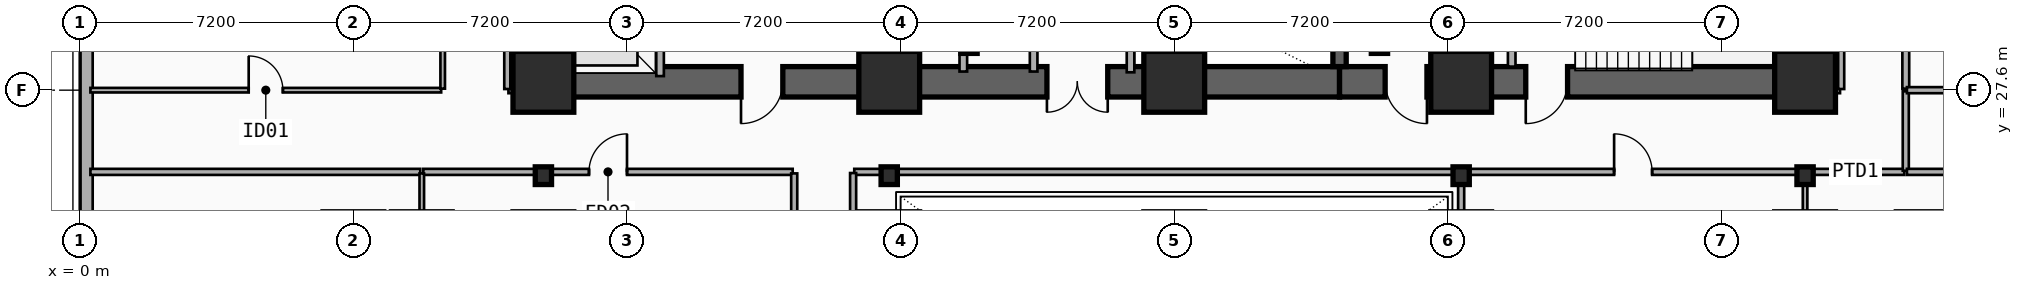
"""IFC4 building model, lengths in metres.
Left out: names, types, materials, properties, quantities, classifications, styles, units other than length and angle.
Written with IfcOpenShell. Run it as: python <this file> out.ifc"""

import sys

from ifc_helpers import new_model, si_unit, direction, frame, frame_2d, origin, origin_2d, place, context, subcontext, project, spatial, rectangle, i_section, extrude, element, fill, save


model = new_model("IFC4")
c1 = context("Model", 3, precision=1e-05, world=origin(), true_north=direction((0.0, 1.0)))
c2 = subcontext(c1, "Body", "Model", "MODEL_VIEW")
j1 = project(units=[si_unit("LENGTHUNIT", "METRE"), si_unit("PLANEANGLEUNIT", "RADIAN")], contexts=[c1])
p1 = place(None, origin())
s1 = spatial("IfcSite", under=j1, at=p1, CompositionType="ELEMENT")
p2 = place(p1, origin())
s2 = spatial("IfcBuilding", under=s1, at=p2, CompositionType="ELEMENT")
p3 = place(p2, frame((0.0, 0.0, 10.4)))
s3 = spatial("IfcBuildingStorey", under=s2, at=p3, CompositionType="ELEMENT", Elevation=10.4)
p4 = place(p3, frame((21.18, 27.82, 0.0), z_axis=(0.0, 0.0, 1.0), x_axis=(-1.0, 0.0, 0.0)))
e1 = element("IfcWall", 1, at=p4, inside=s3, PredefinedType="SHEAR", context=c2, shape_type="SweptSolid", body=[
    extrude(rectangle(XDim=9.03, YDim=0.8, at=frame_2d((4.515, 0.0))), origin(), (0.0, 0.0, 1.0), 4.5),
])
p5 = place(p4, frame((2.68, 0.0, 0.0)))
e2 = element("IfcOpeningElement", 2, at=p5, cuts=e1, PredefinedType="OPENING", context=c2, shape_type="SweptSolid", body=[
    extrude(rectangle(XDim=1.1, YDim=2.15, at=frame_2d((0.55, 1.075))), frame((0.0, 0.41, 0.0), z_axis=(0.0, -1.0, 0.0), x_axis=(1.0, 0.0, 0.0)), (0.0, 0.0, 1.0), 0.82),
])
p6 = place(p3, frame((33.15, 27.82, 0.0), z_axis=(0.0, 0.0, 1.0), x_axis=(-1.0, 0.0, 0.0)))
e3 = element("IfcWall", 3, at=p6, inside=s3, PredefinedType="SHEAR", context=c2, shape_type="SweptSolid", body=[
    extrude(rectangle(XDim=11.97, YDim=0.8, at=frame_2d((5.985, 0.0))), origin(), (0.0, 0.0, 1.0), 4.5),
])
p7 = place(p6, frame((6.1, 0.0, 0.0)))
e4 = element("IfcOpeningElement", 4, at=p7, cuts=e3, PredefinedType="OPENING", context=c2, shape_type="SweptSolid", body=[
    extrude(rectangle(XDim=1.6, YDim=2.2, at=frame_2d((0.8, 1.1))), frame((0.0, 0.41, 0.0), z_axis=(0.0, -1.0, 0.0), x_axis=(1.0, 0.0, 0.0)), (0.0, 0.0, 1.0), 0.82),
])
p8 = place(p3, frame((45.38, 27.82, 0.0), z_axis=(0.0, 0.0, 1.0), x_axis=(-1.0, 0.0, 0.0)))
e5 = element("IfcWall", 5, at=p8, inside=s3, PredefinedType="SHEAR", context=c2, shape_type="SweptSolid", body=[
    extrude(rectangle(XDim=12.23, YDim=0.8, at=frame_2d((6.115, 0.0))), origin(), (0.0, 0.0, 1.0), 4.5),
])
p9 = place(p8, frame((9.93, 0.0, 0.0)))
e6 = element("IfcOpeningElement", 6, at=p9, cuts=e5, PredefinedType="OPENING", context=c2, shape_type="SweptSolid", body=[
    extrude(rectangle(XDim=1.1, YDim=2.15, at=frame_2d((0.55, 1.075))), frame((0.0, 0.41, 0.0), z_axis=(0.0, -1.0, 0.0), x_axis=(1.0, 0.0, 0.0)), (0.0, 0.0, 1.0), 0.82),
])
p10 = place(p8, frame((6.23, 0.0, 0.0)))
e7 = element("IfcOpeningElement", 7, at=p10, cuts=e5, PredefinedType="OPENING", context=c2, shape_type="SweptSolid", body=[
    extrude(rectangle(XDim=1.1, YDim=2.15, at=frame_2d((0.55, 1.075))), frame((0.0, 0.41, 0.0), z_axis=(0.0, -1.0, 0.0), x_axis=(1.0, 0.0, 0.0)), (0.0, 0.0, 1.0), 0.82),
])
for number, where, z_axis, x_axis in (
    (8, (12.15, 28.22, 0.0), (0.0, 0.0, 1.0), (0.0, 1.0, 0.0)),
    (9, (45.38, 28.22, 0.0), (0.0, 0.0, 1.0), (0.0, 1.0, 0.0)),
):
    element("IfcWall", number, at=place(p3, frame(where, z_axis=z_axis, x_axis=x_axis)), inside=s3, PredefinedType="SHEAR", context=c2, shape_type="SweptSolid", body=[
        extrude(rectangle(XDim=8.43, YDim=0.8, at=frame_2d((4.215, 0.0))), origin(), (0.0, 0.0, 1.0), 4.5),
    ])
for number, where, z_axis, x_axis in (
    (10, (21.18, 28.22, 0.0), (0.0, 0.0, 1.0), (0.0, 1.0, 0.0)),
    (11, (33.15, 28.22, 0.0), (0.0, 0.0, 1.0), (0.0, 1.0, 0.0)),
):
    element("IfcWall", number, at=place(p3, frame(where, z_axis=z_axis, x_axis=x_axis)), inside=s3, PredefinedType="SHEAR", context=c2, shape_type="SweptSolid", body=[
        extrude(rectangle(XDim=8.43, YDim=0.35, at=frame_2d((4.215, 0.0))), origin(), (0.0, 0.0, 1.0), 4.5),
    ])
p11 = place(p3, frame((36.38, 28.22, 0.0), z_axis=(0.0, 0.0, 1.0), x_axis=(0.0, 1.0, 0.0)))
e12 = element("IfcWall", 12, at=p11, inside=s3, PredefinedType="SHEAR", context=c2, shape_type="SweptSolid", body=[
    extrude(rectangle(XDim=8.43, YDim=0.35, at=frame_2d((4.215, 0.0))), origin(), (0.0, 0.0, 1.0), 4.5),
])
p12 = place(p11, frame((3.56, 0.0, 0.0)))
e13 = element("IfcOpeningElement", 13, at=p12, cuts=e12, PredefinedType="OPENING", context=c2, shape_type="SweptSolid", body=[
    extrude(rectangle(XDim=1.1, YDim=2.15, at=frame_2d((0.55, 1.075))), frame((0.0, 0.185, 0.0), z_axis=(0.0, -1.0, 0.0), x_axis=(1.0, 0.0, 0.0)), (0.0, 0.0, 1.0), 0.37),
])
for number, where, z_axis, x_axis in (
    (14, (23.4, 28.8, 0.0), (0.0, 0.0, 1.0), (1.0, 0.0, 0.0)),
    (15, (34.2, 28.8, 0.0), (0.0, 0.0, 1.0), (1.0, 0.0, 0.0)),
):
    element("IfcColumn", number, at=place(p3, frame(where, z_axis=z_axis, x_axis=x_axis)), inside=s3, PredefinedType="COLUMN", context=c2, shape_type="SweptSolid", body=[
        extrude(i_section(OverallWidth=0.428, OverallDepth=0.465, WebThickness=0.045, FlangeThickness=0.073, FilletRadius=0.015, at=origin_2d()), origin(), (0.0, 0.0, 1.0), 4.5),
    ])
for number, where, z_axis, x_axis in (
    (16, (12.2, 27.82, 0.0), (0.0, 0.0, 1.0), (1.0, 0.0, 0.0)),
    (17, (21.3, 27.82, 0.0), (0.0, 0.0, 1.0), (1.0, 0.0, 0.0)),
    (18, (28.8, 27.82, 0.0), (0.0, 0.0, 1.0), (1.0, 0.0, 0.0)),
    (19, (36.35, 27.82, 0.0), (0.0, 0.0, 1.0), (1.0, 0.0, 0.0)),
    (20, (45.4, 27.82, 0.0), (0.0, 0.0, 1.0), (1.0, 0.0, 0.0)),
):
    element("IfcColumn", number, at=place(p3, frame(where, z_axis=z_axis, x_axis=x_axis)), inside=s3, PredefinedType="COLUMN", context=c2, shape_type="SweptSolid", body=[
        extrude(rectangle(XDim=1.6, YDim=1.6, at=origin_2d()), origin(), (0.0, 0.0, 1.0), 4.5),
    ])
for number, where, z_axis, x_axis in (
    (21, (12.2, 25.35, 0.0), (0.0, 0.0, 1.0), (1.0, 0.0, 0.0)),
    (22, (21.3, 25.35, 0.0), (0.0, 0.0, 1.0), (1.0, 0.0, 0.0)),
    (23, (36.35, 25.35, 0.0), (0.0, 0.0, 1.0), (1.0, 0.0, 0.0)),
    (24, (45.4, 25.35, 0.0), (0.0, 0.0, 1.0), (1.0, 0.0, 0.0)),
):
    element("IfcColumn", number, at=place(p3, frame(where, z_axis=z_axis, x_axis=x_axis)), inside=s3, PredefinedType="COLUMN", context=c2, shape_type="SweptSolid", body=[
        extrude(i_section(OverallWidth=0.428, OverallDepth=0.465, WebThickness=0.045, FlangeThickness=0.073, FilletRadius=0.015, at=origin_2d()), origin(), (0.0, 0.0, 1.0), 4.5),
    ])
p13 = place(p3, frame((0.18, 7.2, 0.0), z_axis=(0.0, 0.0, 1.0), x_axis=(0.0, 1.0, 0.0)))
e25 = element("IfcWall", 25, at=p13, inside=s3, PredefinedType="SOLIDWALL", context=c2, shape_type="SweptSolid", body=[
    extrude(rectangle(XDim=34.4, YDim=0.32, at=frame_2d((17.2, 0.0))), origin(), (0.0, 0.0, 1.0), 4.2),
])
p14 = place(p13, frame((22.35, 0.0, 0.9)))
e26 = element("IfcOpeningElement", 26, at=p14, cuts=e25, PredefinedType="OPENING", context=c2, shape_type="SweptSolid", body=[
    extrude(rectangle(XDim=2.4, YDim=1.8, at=frame_2d((1.2, 0.9))), frame((0.0, 0.17, 0.0), z_axis=(0.0, -1.0, 0.0), x_axis=(1.0, 0.0, 0.0)), (0.0, 0.0, 1.0), 0.34),
])
p15 = place(p13, frame((26.4, 0.0, 0.9)))
e27 = element("IfcOpeningElement", 27, at=p15, cuts=e25, PredefinedType="OPENING", context=c2, shape_type="SweptSolid", body=[
    extrude(rectangle(XDim=2.4, YDim=1.8, at=frame_2d((1.2, 0.9))), frame((0.0, 0.17, 0.0), z_axis=(0.0, -1.0, 0.0), x_axis=(1.0, 0.0, 0.0)), (0.0, 0.0, 1.0), 0.34),
])
p16 = place(p13, frame((4.597, 0.0, 0.9)))
e28 = element("IfcOpeningElement", 28, at=p16, cuts=e25, PredefinedType="OPENING", context=c2, shape_type="SweptSolid", body=[
    extrude(rectangle(XDim=2.4, YDim=1.8, at=frame_2d((1.2, 0.9))), frame((0.0, 0.17, 0.0), z_axis=(0.0, -1.0, 0.0), x_axis=(1.0, 0.0, 0.0)), (0.0, 0.0, 1.0), 0.34),
])
p17 = place(p13, frame((11.273, 0.0, 0.9)))
e29 = element("IfcOpeningElement", 29, at=p17, cuts=e25, PredefinedType="OPENING", context=c2, shape_type="SweptSolid", body=[
    extrude(rectangle(XDim=2.4, YDim=1.8, at=frame_2d((1.2, 0.9))), frame((0.0, 0.17, 0.0), z_axis=(0.0, -1.0, 0.0), x_axis=(1.0, 0.0, 0.0)), (0.0, 0.0, 1.0), 0.34),
])
p18 = place(p3, frame((15.27, 27.97, 0.0), z_axis=(0.0, 0.0, 1.0), x_axis=(0.0, 1.0, 0.0)))
e30 = element("IfcWall", 30, at=p18, inside=s3, PredefinedType="PARTITIONING", context=c2, shape_type="SweptSolid", body=[
    extrude(rectangle(XDim=2.96, YDim=0.2, at=frame_2d((1.48, 0.0))), origin(), (0.0, 0.0, 1.0), 3.172),
])
p19 = place(p18, frame((0.93, 0.0, 0.0)))
e31 = element("IfcOpeningElement", 31, at=p19, cuts=e30, PredefinedType="OPENING", context=c2, shape_type="SweptSolid", body=[
    extrude(rectangle(XDim=1.1, YDim=2.15, at=frame_2d((0.55, 1.075))), frame((0.0, 0.11, 0.0), z_axis=(0.0, -1.0, 0.0), x_axis=(1.0, 0.0, 0.0)), (0.0, 0.0, 1.0), 0.22),
])
p20 = place(p3, frame((27.65, 28.07, 0.0), z_axis=(0.0, 0.0, 1.0), x_axis=(0.0, 1.0, 0.0)))
e32 = element("IfcWall", 32, at=p20, inside=s3, PredefinedType="PARTITIONING", context=c2, shape_type="SweptSolid", body=[
    extrude(rectangle(XDim=2.58, YDim=0.2, at=frame_2d((1.29, 0.0))), origin(), (0.0, 0.0, 1.0), 3.172),
])
p21 = place(p3, frame((37.68, 28.22, 0.0), z_axis=(0.0, 0.0, 1.0), x_axis=(0.0, 1.0, 0.0)))
e33 = element("IfcWall", 33, at=p21, inside=s3, PredefinedType="PARTITIONING", context=c2, shape_type="SweptSolid", body=[
    extrude(rectangle(XDim=3.03, YDim=0.2, at=frame_2d((1.515, 0.0))), origin(), (0.0, 0.0, 1.0), 4.2),
])
p22 = place(p3, frame((25.1, 28.09, 0.0), z_axis=(0.0, 0.0, 1.0), x_axis=(0.0, 1.0, 0.0)))
e34 = element("IfcWall", 34, at=p22, inside=s3, PredefinedType="PARTITIONING", context=c2, shape_type="SweptSolid", body=[
    extrude(rectangle(XDim=4.12, YDim=0.2, at=frame_2d((2.06, 0.0))), origin(), (0.0, 0.0, 1.0), 4.2),
])
p23 = place(p22, frame((1.46, 0.0, 0.0)))
e35 = element("IfcOpeningElement", 35, at=p23, cuts=e34, PredefinedType="OPENING", context=c2, shape_type="SweptSolid", body=[
    extrude(rectangle(XDim=1.2, YDim=2.15, at=frame_2d((0.6, 1.075))), frame((0.0, 0.11, 0.0), z_axis=(0.0, -1.0, 0.0), x_axis=(1.0, 0.0, 0.0)), (0.0, 0.0, 1.0), 0.22),
])
p24 = place(p3, frame((23.25, 28.09, 0.0), z_axis=(0.0, 0.0, 1.0), x_axis=(0.0, 1.0, 0.0)))
e36 = element("IfcWall", 36, at=p24, inside=s3, PredefinedType="PARTITIONING", context=c2, shape_type="SweptSolid", body=[
    extrude(rectangle(XDim=4.12, YDim=0.2, at=frame_2d((2.06, 0.0))), origin(), (0.0, 0.0, 1.0), 4.2),
])
p25 = place(p3, frame((0.28, 27.6, 0.0), z_axis=(0.0, 0.0, 1.0), x_axis=(1.0, 0.0, 0.0)))
e37 = element("IfcWall", 37, at=p25, inside=s3, PredefinedType="PARTITIONING", context=c2, shape_type="SweptSolid", body=[
    extrude(rectangle(XDim=9.23, YDim=0.12, at=frame_2d((4.615, 0.0))), origin(), (0.0, 0.0, 1.0), 4.2),
])
p26 = place(p25, frame((4.165, 0.0, 0.0)))
e38 = element("IfcOpeningElement", 38, at=p26, cuts=e37, PredefinedType="OPENING", context=c2, shape_type="SweptSolid", body=[
    extrude(rectangle(XDim=0.9, YDim=2.1, at=frame_2d((0.45, 1.05))), frame((0.0, 0.07, 0.0), z_axis=(0.0, -1.0, 0.0), x_axis=(1.0, 0.0, 0.0)), (0.0, 0.0, 1.0), 0.14),
])
p27 = place(p3, frame((0.28, 25.45, 0.0), z_axis=(0.0, 0.0, 1.0), x_axis=(1.0, 0.0, 0.0)))
e39 = element("IfcWall", 39, at=p27, inside=s3, PredefinedType="PARTITIONING", context=c2, shape_type="SweptSolid", body=[
    extrude(rectangle(XDim=8.68, YDim=0.16, at=frame_2d((4.34, 0.0))), origin(), (0.0, 0.0, 1.0), 4.2),
])
p28 = place(p3, frame((9.04, 25.45, 0.0), z_axis=(0.0, 0.0, 1.0), x_axis=(1.0, 0.0, 0.0)))
e40 = element("IfcWall", 40, at=p28, inside=s3, PredefinedType="PARTITIONING", context=c2, shape_type="SweptSolid", body=[
    extrude(rectangle(XDim=9.72, YDim=0.16, at=frame_2d((4.86, 0.0))), origin(), (0.0, 0.0, 1.0), 3.366),
])
p29 = place(p28, frame((4.36, 0.0, 0.0)))
e41 = element("IfcOpeningElement", 41, at=p29, cuts=e40, PredefinedType="OPENING", context=c2, shape_type="SweptSolid", body=[
    extrude(rectangle(XDim=1.0, YDim=2.15, at=frame_2d((0.5, 1.075))), frame((0.0, 0.09, 0.0), z_axis=(0.0, -1.0, 0.0), x_axis=(1.0, 0.0, 0.0)), (0.0, 0.0, 1.0), 0.18),
])
p30 = place(p3, frame((36.39, 25.45, 0.0), z_axis=(0.0, 0.0, 1.0), x_axis=(1.0, 0.0, 0.0)))
e42 = element("IfcWall", 42, at=p30, inside=s3, PredefinedType="PARTITIONING", context=c2, shape_type="SweptSolid", body=[
    extrude(rectangle(XDim=8.97, YDim=0.16, at=frame_2d((4.485, 0.0))), origin(), (0.0, 0.0, 1.0), 3.366),
])
p31 = place(p30, frame((3.985, 0.0, 0.0)))
e43 = element("IfcOpeningElement", 43, at=p31, cuts=e42, PredefinedType="OPENING", context=c2, shape_type="SweptSolid", body=[
    extrude(rectangle(XDim=1.0, YDim=2.15, at=frame_2d((0.5, 1.075))), frame((0.0, 0.09, 0.0), z_axis=(0.0, -1.0, 0.0), x_axis=(1.0, 0.0, 0.0)), (0.0, 0.0, 1.0), 0.18),
])
p32 = place(p3, frame((45.44, 25.45, 0.0), z_axis=(0.0, 0.0, 1.0), x_axis=(1.0, 0.0, 0.0)))
e44 = element("IfcWall", 44, at=p32, inside=s3, PredefinedType="PARTITIONING", context=c2, shape_type="SweptSolid", body=[
    extrude(rectangle(XDim=2.57, YDim=0.16, at=frame_2d((1.285, 0.0))), origin(), (0.0, 0.0, 1.0), 3.366),
])
p33 = place(p3, frame((9.55, 27.64, 0.0), z_axis=(0.0, 0.0, 1.0), x_axis=(0.0, 1.0, 0.0)))
e45 = element("IfcWall", 45, at=p33, inside=s3, PredefinedType="PARTITIONING", context=c2, shape_type="SweptSolid", body=[
    extrude(rectangle(XDim=10.27, YDim=0.12, at=frame_2d((5.135, 0.0))), origin(), (0.0, 0.0, 1.0), 4.2),
])
p34 = place(p33, frame((4.685, 0.0, 0.0)))
e46 = element("IfcOpeningElement", 46, at=p34, cuts=e45, PredefinedType="OPENING", context=c2, shape_type="SweptSolid", body=[
    extrude(rectangle(XDim=0.9, YDim=2.1, at=frame_2d((0.45, 1.05))), frame((0.0, 0.07, 0.0), z_axis=(0.0, -1.0, 0.0), x_axis=(1.0, 0.0, 0.0)), (0.0, 0.0, 1.0), 0.14),
])
p35 = place(p3, frame((48.05, 27.64, 0.0), z_axis=(0.0, 0.0, 1.0), x_axis=(0.0, 1.0, 0.0)))
e47 = element("IfcWall", 47, at=p35, inside=s3, PredefinedType="PLUMBINGWALL", context=c2, shape_type="SweptSolid", body=[
    extrude(rectangle(XDim=3.92, YDim=0.18, at=frame_2d((1.96, 0.0))), origin(), (0.0, 0.0, 1.0), 4.2),
])
p36 = place(p35, frame((1.535, 0.0, 0.0)))
e48 = element("IfcOpeningElement", 48, at=p36, cuts=e47, PredefinedType="OPENING", context=c2, shape_type="SweptSolid", body=[
    extrude(rectangle(XDim=0.85, YDim=2.1, at=frame_2d((0.425, 1.05))), frame((0.0, 0.1, 0.0), z_axis=(0.0, -1.0, 0.0), x_axis=(1.0, 0.0, 0.0)), (0.0, 0.0, 1.0), 0.2),
])
p37 = place(p3, frame((18.8, 12.04, 0.0), z_axis=(0.0, 0.0, 1.0), x_axis=(0.0, 1.0, 0.0)))
e49 = element("IfcWall", 49, at=p37, inside=s3, PredefinedType="PARTITIONING", context=c2, shape_type="SweptSolid", body=[
    extrude(rectangle(XDim=13.37, YDim=0.16, at=frame_2d((6.685, 0.0))), origin(), (0.0, 0.0, 1.0), 3.172),
])
p38 = place(p37, frame((6.185, 0.0, 0.0)))
e50 = element("IfcOpeningElement", 50, at=p38, cuts=e49, PredefinedType="OPENING", context=c2, shape_type="SweptSolid", body=[
    extrude(rectangle(XDim=1.0, YDim=2.15, at=frame_2d((0.5, 1.075))), frame((0.0, 0.09, 0.0), z_axis=(0.0, -1.0, 0.0), x_axis=(1.0, 0.0, 0.0)), (0.0, 0.0, 1.0), 0.18),
])
p39 = place(p3, frame((9.0, 3.88, 0.0), z_axis=(0.0, 0.0, 1.0), x_axis=(0.0, 1.0, 0.0)))
e51 = element("IfcWall", 51, at=p39, inside=s3, PredefinedType="PARTITIONING", context=c2, shape_type="SweptSolid", body=[
    extrude(rectangle(XDim=21.53, YDim=0.12, at=frame_2d((10.765, 0.0))), origin(), (0.0, 0.0, 1.0), 3.53),
])
p40 = place(p39, frame((10.315, 0.0, 0.0)))
e52 = element("IfcOpeningElement", 52, at=p40, cuts=e51, PredefinedType="OPENING", context=c2, shape_type="SweptSolid", body=[
    extrude(rectangle(XDim=0.9, YDim=2.1, at=frame_2d((0.45, 1.05))), frame((0.0, 0.07, 0.0), z_axis=(0.0, -1.0, 0.0), x_axis=(1.0, 0.0, 0.0)), (0.0, 0.0, 1.0), 0.14),
])
p41 = place(p3, frame((45.4, 3.88, 0.0), z_axis=(0.0, 0.0, 1.0), x_axis=(0.0, 1.0, 0.0)))
e53 = element("IfcWall", 53, at=p41, inside=s3, PredefinedType="PARTITIONING", context=c2, shape_type="SweptSolid", body=[
    extrude(rectangle(XDim=21.53, YDim=0.12, at=frame_2d((10.765, 0.0))), origin(), (0.0, 0.0, 1.0), 3.172),
])
p42 = place(p41, frame((2.684, 0.0, 0.0)))
e54 = element("IfcOpeningElement", 54, at=p42, cuts=e53, PredefinedType="OPENING", context=c2, shape_type="SweptSolid", body=[
    extrude(rectangle(XDim=0.9, YDim=2.1, at=frame_2d((0.45, 1.05))), frame((0.0, 0.07, 0.0), z_axis=(0.0, -1.0, 0.0), x_axis=(1.0, 0.0, 0.0)), (0.0, 0.0, 1.0), 0.14),
])
p43 = place(p3, frame((20.38, 25.45, 0.0), z_axis=(0.0, 0.0, 1.0), x_axis=(1.0, 0.0, 0.0)))
e55 = element("IfcWall", 55, at=p43, inside=s3, PredefinedType="PARTITIONING", context=c2, shape_type="SweptSolid", body=[
    extrude(rectangle(XDim=15.94, YDim=0.16, at=frame_2d((7.97, 0.0))), origin(), (0.0, 0.0, 1.0), 3.366),
])
p44 = place(p3, frame((11.28, 27.6, 0.0), z_axis=(0.0, 0.0, 1.0), x_axis=(1.0, 0.0, 0.0)))
e56 = element("IfcWall", 56, at=p44, inside=s3, PredefinedType="PARTITIONING", context=c2, shape_type="SweptSolid", body=[
    extrude(rectangle(XDim=0.84, YDim=0.16, at=frame_2d((0.42, 0.0))), origin(), (0.0, 0.0, 1.0), 3.172),
])
p45 = place(p3, frame((45.41, 27.6, 0.0), z_axis=(0.0, 0.0, 1.0), x_axis=(1.0, 0.0, 0.0)))
e57 = element("IfcWall", 57, at=p45, inside=s3, PredefinedType="PARTITIONING", context=c2, shape_type="SweptSolid", body=[
    extrude(rectangle(XDim=0.91, YDim=0.16, at=frame_2d((0.455, 0.0))), origin(), (0.0, 0.0, 1.0), 3.172),
])
p46 = place(p3, frame((48.05, 25.48, 0.0), z_axis=(0.0, 0.0, 1.0), x_axis=(0.0, 1.0, 0.0)))
e58 = element("IfcWall", 58, at=p46, inside=s3, PredefinedType="PARTITIONING", context=c2, shape_type="SweptSolid", body=[
    extrude(rectangle(XDim=2.09, YDim=0.16, at=frame_2d((1.045, 0.0))), origin(), (0.0, 0.0, 1.0), 4.2),
])
for number, where, z_axis, x_axis in (
    (59, (11.25, 27.63, 0.0), (0.0, 0.0, 1.0), (0.0, 1.0, 0.0)),
    (60, (46.35, 27.63, 0.0), (0.0, 0.0, 1.0), (0.0, 1.0, 0.0)),
):
    element("IfcWall", number, at=place(p3, frame(where, z_axis=z_axis, x_axis=x_axis)), inside=s3, PredefinedType="PARTITIONING", context=c2, shape_type="SweptSolid", body=[
        extrude(rectangle(XDim=10.29, YDim=0.16, at=frame_2d((5.145, 0.0))), origin(), (0.0, 0.0, 1.0), 4.2),
    ])
p47 = place(p3, frame((48.08, 27.6, 0.0), z_axis=(0.0, 0.0, 1.0), x_axis=(1.0, 0.0, 0.0)))
e61 = element("IfcWall", 61, at=p47, inside=s3, PredefinedType="PARTITIONING", context=c2, shape_type="SweptSolid", body=[
    extrude(rectangle(XDim=4.69, YDim=0.16, at=frame_2d((2.345, 0.0))), origin(), (0.0, 0.0, 1.0), 4.2),
])
for number, where, z_axis, x_axis in (
    (62, (20.35, 14.23, 0.0), (0.0, 0.0, 1.0), (0.0, 1.0, 0.0)),
    (63, (36.35, 14.23, 0.0), (0.0, 0.0, 1.0), (0.0, 1.0, 0.0)),
):
    element("IfcWall", number, at=place(p3, frame(where, z_axis=z_axis, x_axis=x_axis)), inside=s3, PredefinedType="PARTITIONING", context=c2, shape_type="SweptSolid", body=[
        extrude(rectangle(XDim=11.19, YDim=0.16, at=frame_2d((5.595, 0.0))), origin(), (0.0, 0.0, 1.0), 3.172),
    ])
p48 = place(p3, frame((48.08, 25.45, 0.0), z_axis=(0.0, 0.0, 1.0), x_axis=(1.0, 0.0, 0.0)))
e64 = element("IfcWall", 64, at=p48, inside=s3, PredefinedType="PARTITIONING", context=c2, shape_type="SweptSolid", body=[
    extrude(rectangle(XDim=9.21, YDim=0.16, at=frame_2d((4.605, 0.0))), origin(), (0.0, 0.0, 1.0), 4.2),
])
p49 = place(p5, origin())
e65 = element("IfcDoor", 65, at=p49, inside=s3, OperationType="SINGLE_SWING_RIGHT", PredefinedType="DOOR", context=c2, shape_type="SweptSolid", body=[
    extrude(rectangle(XDim=1.1, YDim=2.15, at=frame_2d((0.55, 1.075))), frame((0.0, 0.025, 0.0), z_axis=(0.0, -1.0, 0.0), x_axis=(1.0, 0.0, 0.0)), (0.0, 0.0, 1.0), 0.05),
])
fill(e2, e65)
p50 = place(p9, origin())
e66 = element("IfcDoor", 66, at=p50, inside=s3, OperationType="SINGLE_SWING_LEFT", PredefinedType="DOOR", context=c2, shape_type="SweptSolid", body=[
    extrude(rectangle(XDim=1.1, YDim=2.15, at=frame_2d((0.55, 1.075))), frame((0.0, 0.025, 0.0), z_axis=(0.0, -1.0, 0.0), x_axis=(1.0, 0.0, 0.0)), (0.0, 0.0, 1.0), 0.05),
])
fill(e6, e66)
p51 = place(p10, origin())
e67 = element("IfcDoor", 67, at=p51, inside=s3, OperationType="SINGLE_SWING_RIGHT", PredefinedType="DOOR", context=c2, shape_type="SweptSolid", body=[
    extrude(rectangle(XDim=1.1, YDim=2.15, at=frame_2d((0.55, 1.075))), frame((0.0, 0.025, 0.0), z_axis=(0.0, -1.0, 0.0), x_axis=(1.0, 0.0, 0.0)), (0.0, 0.0, 1.0), 0.05),
])
fill(e7, e67)
p52 = place(p7, origin())
e68 = element("IfcDoor", 68, at=p52, inside=s3, OperationType="SINGLE_SWING_LEFT", PredefinedType="DOOR", context=c2, shape_type="SweptSolid", body=[
    extrude(rectangle(XDim=1.6, YDim=2.2, at=frame_2d((0.8, 1.1))), frame((0.0, 0.025, 0.0), z_axis=(0.0, -1.0, 0.0), x_axis=(1.0, 0.0, 0.0)), (0.0, 0.0, 1.0), 0.05),
])
fill(e4, e68)
p53 = place(p26, origin())
e69 = element("IfcDoor", 69, at=p53, inside=s3, OperationType="SINGLE_SWING_LEFT", PredefinedType="DOOR", context=c2, shape_type="SweptSolid", body=[
    extrude(rectangle(XDim=0.9, YDim=2.1, at=frame_2d((0.45, 1.05))), frame((0.0, 0.025, 0.0), z_axis=(0.0, -1.0, 0.0), x_axis=(1.0, 0.0, 0.0)), (0.0, 0.0, 1.0), 0.05),
])
fill(e38, e69)
p54 = place(p29, origin())
e70 = element("IfcDoor", 70, at=p54, inside=s3, OperationType="SINGLE_SWING_RIGHT", PredefinedType="DOOR", context=c2, shape_type="SweptSolid", body=[
    extrude(rectangle(XDim=1.0, YDim=2.15, at=frame_2d((0.5, 1.075))), frame((0.0, 0.025, 0.0), z_axis=(0.0, -1.0, 0.0), x_axis=(1.0, 0.0, 0.0)), (0.0, 0.0, 1.0), 0.05),
])
fill(e41, e70)
p55 = place(p31, origin())
e71 = element("IfcDoor", 71, at=p55, inside=s3, OperationType="SINGLE_SWING_LEFT", PredefinedType="DOOR", context=c2, shape_type="SweptSolid", body=[
    extrude(rectangle(XDim=1.0, YDim=2.15, at=frame_2d((0.5, 1.075))), frame((0.0, 0.025, 0.0), z_axis=(0.0, -1.0, 0.0), x_axis=(1.0, 0.0, 0.0)), (0.0, 0.0, 1.0), 0.05),
])
fill(e43, e71)
save(model, sys.argv[1])
